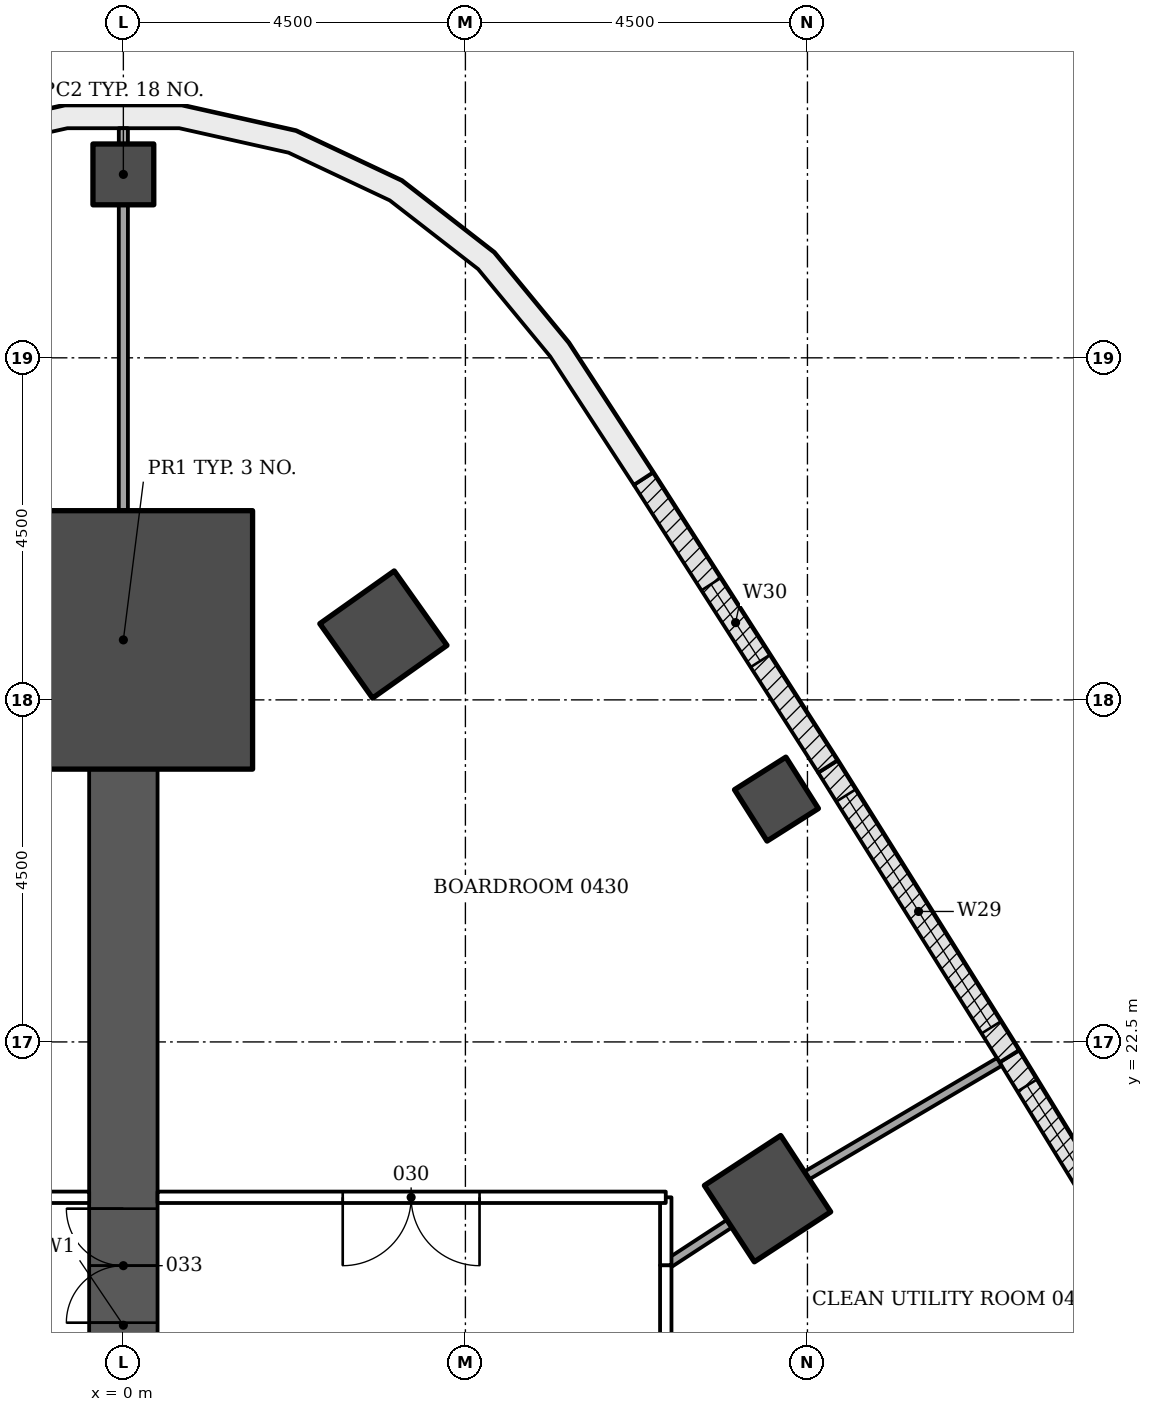
"""IFC4 building model, lengths in metres.
Left out: names, types, materials, properties, quantities, classifications, styles, units other than length and angle.
Written with IfcOpenShell. Run it as: python <this file> out.ifc"""

import sys

from ifc_helpers import new_model, si_unit, direction, frame, frame_2d, origin, origin_2d, place, context, subcontext, project, spatial, polyline, rectangle, outline, extrude, element, fill, save


model = new_model("IFC4")
c1 = context("Model", 3, precision=1e-05, world=origin(), true_north=direction((0.0, 1.0)))
c2 = subcontext(c1, "Body", "Model", "MODEL_VIEW")
j1 = project(units=[si_unit("LENGTHUNIT", "METRE"), si_unit("PLANEANGLEUNIT", "RADIAN")], contexts=[c1])
p1 = place(None, origin())
s1 = spatial("IfcSite", under=j1, at=p1, CompositionType="ELEMENT")
p2 = place(p1, origin())
s2 = spatial("IfcBuilding", under=s1, at=p2, CompositionType="ELEMENT")
p3 = place(p2, frame((0.0, 0.0, 19.5)))
s3 = spatial("IfcBuildingStorey", under=s2, at=p3, CompositionType="ELEMENT", Elevation=19.5)
for number, where, z_axis, x_axis in (
    (1, (8.475, 20.438, -0.25), (0.0, 0.0, 1.0), (0.837, 0.547, 0.0)),
    (2, (3.421, 27.86, -0.25), (0.0, 0.0, 1.0), (0.816, 0.578, 0.0)),
):
    element("IfcColumn", number, at=place(p3, frame(where, z_axis=z_axis, x_axis=x_axis)), inside=s3, PredefinedType="COLUMN", context=c2, shape_type="SweptSolid", body=[
        extrude(rectangle(XDim=1.2, YDim=1.2, at=origin_2d()), origin(), (0.0, 0.0, 1.0), 4.55),
    ])
for number, where, z_axis, x_axis in (
    (3, (0.0, 33.913, -0.25), (0.0, 0.0, 1.0), (0.0, 1.0, 0.0)),
    (4, (8.592, 25.695, -0.25), (0.0, 0.0, 1.0), (0.845, 0.535, 0.0)),
):
    element("IfcColumn", number, at=place(p3, frame(where, z_axis=z_axis, x_axis=x_axis)), inside=s3, PredefinedType="COLUMN", context=c2, shape_type="SweptSolid", body=[
        extrude(rectangle(XDim=0.8, YDim=0.8, at=origin_2d()), origin(), (0.0, 0.0, 1.0), 4.55),
    ])
p4 = place(p3, frame((0.0, 11.456, -0.25), z_axis=(0.0, 0.0, 1.0), x_axis=(0.0, 1.0, 0.0)))
e5 = element("IfcWall", 5, at=p4, inside=s3, PredefinedType="SHEAR", context=c2, shape_type="SweptSolid", body=[
    extrude(rectangle(XDim=14.633, YDim=0.9, at=frame_2d((7.316, 0.0))), origin(), (0.0, 0.0, 1.0), 4.55),
])
p5 = place(p4, frame((7.35, 0.0, 0.25)))
e6 = element("IfcOpeningElement", 6, at=p5, cuts=e5, PredefinedType="OPENING", context=c2, shape_type="SweptSolid", body=[
    extrude(rectangle(XDim=1.5, YDim=2.1, at=frame_2d((0.75, 1.05))), frame((0.0, 0.46, 0.0), z_axis=(0.0, -1.0, 0.0), x_axis=(1.0, 0.0, 0.0)), (0.0, 0.0, 1.0), 0.92),
])
p6 = place(p3, frame((0.0, 27.789, -0.25), z_axis=(0.0, 0.0, 1.0), x_axis=(0.0, 1.0, 0.0)))
e7 = element("IfcColumn", 7, at=p6, inside=s3, PredefinedType="COLUMN", context=c2, shape_type="SweptSolid", body=[
    extrude(rectangle(XDim=3.4, YDim=3.4, at=origin_2d()), origin(), (0.0, 0.0, 1.0), 4.55),
])
p7 = place(p3, frame((11.656, 22.309, 0.0), z_axis=(0.0, 0.0, 1.0), x_axis=(0.522078085402, -0.852897691838, 0.0)))
e8 = element("IfcWall", 8, at=p7, inside=s3, PredefinedType="NOTDEFINED", context=c2, shape_type="SweptSolid", body=[
    extrude(rectangle(XDim=4.496, YDim=0.3, at=frame_2d((2.248, 0.0))), origin(), (0.0, 0.0, 1.0), 4.3),
])
p8 = place(p7, frame((0.448, 0.0, 1.5)))
e9 = element("IfcOpeningElement", 9, at=p8, cuts=e8, PredefinedType="OPENING", context=c2, shape_type="SweptSolid", body=[
    extrude(rectangle(XDim=3.6, YDim=1.8, at=frame_2d((1.8, 0.9))), frame((0.0, 0.16, 0.0), z_axis=(0.0, -1.0, 0.0), x_axis=(1.0, 0.0, 0.0)), (0.0, 0.0, 1.0), 0.32),
])
p9 = place(p3, frame((9.269, 26.122, 0.0), z_axis=(0.0, 0.0, 1.0), x_axis=(0.530804082031, -0.847494558389, 0.0)))
e10 = element("IfcWall", 10, at=p9, inside=s3, PredefinedType="NOTDEFINED", context=c2, shape_type="SweptSolid", body=[
    extrude(rectangle(XDim=4.496, YDim=0.3, at=frame_2d((2.248, 0.0))), origin(), (0.0, 0.0, 1.0), 4.3),
])
p10 = place(p9, frame((0.448, 0.0, 1.5)))
e11 = element("IfcOpeningElement", 11, at=p10, cuts=e10, PredefinedType="OPENING", context=c2, shape_type="SweptSolid", body=[
    extrude(rectangle(XDim=3.6, YDim=1.8, at=frame_2d((1.8, 0.9))), frame((0.0, 0.16, 0.0), z_axis=(0.0, -1.0, 0.0), x_axis=(1.0, 0.0, 0.0)), (0.0, 0.0, 1.0), 0.32),
])
p11 = place(p3, frame((6.842, 29.909, 0.0), z_axis=(0.0, 0.0, 1.0), x_axis=(0.539483537275, -0.841996147859, 0.0)))
e12 = element("IfcWall", 12, at=p11, inside=s3, PredefinedType="NOTDEFINED", context=c2, shape_type="SweptSolid", body=[
    extrude(rectangle(XDim=4.496, YDim=0.3, at=frame_2d((2.248, 0.0))), origin(), (0.0, 0.0, 1.0), 4.3),
])
p12 = place(p11, frame((1.648, 0.0, 0.8)))
e13 = element("IfcOpeningElement", 13, at=p12, cuts=e12, PredefinedType="OPENING", context=c2, shape_type="SweptSolid", body=[
    extrude(rectangle(XDim=1.2, YDim=3.0, at=frame_2d((0.6, 1.5))), frame((0.0, 0.16, 0.0), z_axis=(0.0, -1.0, 0.0), x_axis=(1.0, 0.0, 0.0)), (0.0, 0.0, 1.0), 0.32),
])
p13 = place(p3, origin())
e14 = element("IfcWall", 14, at=p13, inside=s3, PredefinedType="NOTDEFINED", context=c2, shape_type="SweptSolid", body=[
    extrude(outline(polyline([(6.967, 29.992), (5.857, 31.697), (4.878, 32.884), (3.663, 33.828), (2.271, 34.485), (0.769, 34.821), (-0.769, 34.821), (-2.271, 34.485), (-3.663, 33.828), (-4.878, 32.884), (-5.857, 31.697), (-6.967, 29.992), (-6.716, 29.828), (-5.615, 31.519), (-4.667, 32.667), (-3.505, 33.571), (-2.173, 34.199), (-0.736, 34.521), (0.736, 34.521), (2.173, 34.199), (3.505, 33.571), (4.667, 32.667), (5.615, 31.519), (6.716, 29.828), (6.967, 29.992)])), origin(), (0.0, 0.0, 1.0), 4.3),
])
p14 = place(p3, frame((7.136, 16.096, 0.0), z_axis=(0.0, 0.0, 1.0), x_axis=(0.0, 1.0, 0.0)))
e15 = element("IfcWall", 15, at=p14, inside=s3, PredefinedType="PARTITIONING", context=c2, shape_type="SweptSolid", body=[
    extrude(rectangle(XDim=3.466, YDim=0.15, at=frame_2d((1.733, 0.0))), origin(), (0.0, 0.0, 1.0), 3.894),
])
p15 = place(p14, frame((1.25, 0.0, 0.0)))
e16 = element("IfcOpeningElement", 16, at=p15, cuts=e15, PredefinedType="OPENING", context=c2, shape_type="SweptSolid", body=[
    extrude(rectangle(XDim=0.9, YDim=2.1, at=frame_2d((0.45, 1.05))), frame((0.0, 0.085, 0.0), z_axis=(0.0, -1.0, 0.0), x_axis=(1.0, 0.0, 0.0)), (0.0, 0.0, 1.0), 0.17),
])
p16 = place(p3, frame((7.136, 19.563, 0.0), z_axis=(0.0, 0.0, 1.0), x_axis=(0.0, 1.0, 0.0)))
e17 = element("IfcWall", 17, at=p16, inside=s3, PredefinedType="PARTITIONING", context=c2, shape_type="SweptSolid", body=[
    extrude(rectangle(XDim=0.893, YDim=0.15, at=frame_2d((0.447, 0.0))), origin(), (0.0, 0.0, 1.0), 3.894),
])
p17 = place(p3, frame((7.136, 20.456, 0.0), z_axis=(0.0, 0.0, 1.0), x_axis=(-1.0, 0.0, 0.0)))
e18 = element("IfcWall", 18, at=p17, inside=s3, PredefinedType="PARTITIONING", context=c2, shape_type="SweptSolid", body=[
    extrude(rectangle(XDim=6.686, YDim=0.15, at=frame_2d((3.343, 0.0))), origin(), (0.0, 0.0, 1.0), 3.843),
])
p18 = place(p17, frame((2.45, 0.0, 0.0)))
e19 = element("IfcOpeningElement", 19, at=p18, cuts=e18, PredefinedType="OPENING", context=c2, shape_type="SweptSolid", body=[
    extrude(rectangle(XDim=1.8, YDim=2.1, at=frame_2d((0.9, 1.05))), frame((0.0, 0.085, 0.0), z_axis=(0.0, -1.0, 0.0), x_axis=(1.0, 0.0, 0.0)), (0.0, 0.0, 1.0), 0.17),
])
p19 = place(p3, frame((-0.45, 20.456, 0.0), z_axis=(0.0, 0.0, 1.0), x_axis=(-1.0, 0.0, 0.0)))
e20 = element("IfcWall", 20, at=p19, inside=s3, PredefinedType="PARTITIONING", context=c2, shape_type="SweptSolid", body=[
    extrude(rectangle(XDim=1.8, YDim=0.15, at=frame_2d((0.9, 0.0))), origin(), (0.0, 0.0, 1.0), 3.843),
])
p20 = place(p3, frame((7.973, 20.109, 0.0), z_axis=(0.0, 0.0, 1.0), x_axis=(-0.836986858992, -0.547222987341, 0.0)))
e21 = element("IfcWall", 21, at=p20, inside=s3, PredefinedType="PARTITIONING", context=c2, shape_type="SweptSolid", body=[
    extrude(rectangle(XDim=0.998, YDim=0.12, at=frame_2d((0.499, 0.0))), origin(), (0.0, 0.0, 1.0), 3.894),
])
p21 = place(p3, frame((11.524, 22.237, 0.0), z_axis=(0.0, 0.0, 1.0), x_axis=(-0.861228913487, -0.508217235613, 0.0)))
e22 = element("IfcWall", 22, at=p21, inside=s3, PredefinedType="PARTITIONING", context=c2, shape_type="SweptSolid", body=[
    extrude(rectangle(XDim=2.94, YDim=0.12, at=frame_2d((1.47, 0.0))), origin(), (0.0, 0.0, 1.0), 3.683),
])
p22 = place(p3, frame((0.0, 29.489, 0.0), z_axis=(0.0, 0.0, 1.0), x_axis=(0.0, 1.0, 0.0)))
e23 = element("IfcWall", 23, at=p22, inside=s3, PredefinedType="PARTITIONING", context=c2, shape_type="SweptSolid", body=[
    extrude(rectangle(XDim=4.024, YDim=0.12, at=frame_2d((2.012, 0.0))), origin(), (0.0, 0.0, 1.0), 3.767),
])
p23 = place(p3, frame((0.0, 34.313, 0.0), z_axis=(0.0, 0.0, 1.0), x_axis=(0.0, 1.0, 0.0)))
e24 = element("IfcWall", 24, at=p23, inside=s3, PredefinedType="PARTITIONING", context=c2, shape_type="SweptSolid", body=[
    extrude(rectangle(XDim=0.208, YDim=0.12, at=frame_2d((0.104, 0.0))), origin(), (0.0, 0.0, 1.0), 4.3),
])
p24 = place(p8, origin())
e25 = element("IfcWindow", 25, at=p24, inside=s3, PartitioningType="SINGLE_PANEL", PredefinedType="WINDOW", context=c2, shape_type="SweptSolid", body=[
    extrude(rectangle(XDim=3.6, YDim=1.8, at=frame_2d((1.8, 0.9))), frame((0.0, 0.03, 0.0), z_axis=(0.0, -1.0, 0.0), x_axis=(1.0, 0.0, 0.0)), (0.0, 0.0, 1.0), 0.06),
])
fill(e9, e25)
p25 = place(p10, origin())
e26 = element("IfcWindow", 26, at=p25, inside=s3, PartitioningType="SINGLE_PANEL", PredefinedType="WINDOW", context=c2, shape_type="SweptSolid", body=[
    extrude(rectangle(XDim=3.6, YDim=1.8, at=frame_2d((1.8, 0.9))), frame((0.0, 0.03, 0.0), z_axis=(0.0, -1.0, 0.0), x_axis=(1.0, 0.0, 0.0)), (0.0, 0.0, 1.0), 0.06),
])
fill(e11, e26)
p26 = place(p12, origin())
e27 = element("IfcWindow", 27, at=p26, inside=s3, PartitioningType="SINGLE_PANEL", PredefinedType="WINDOW", context=c2, shape_type="SweptSolid", body=[
    extrude(rectangle(XDim=1.2, YDim=3.0, at=frame_2d((0.6, 1.5))), frame((0.0, 0.03, 0.0), z_axis=(0.0, -1.0, 0.0), x_axis=(1.0, 0.0, 0.0)), (0.0, 0.0, 1.0), 0.06),
])
fill(e13, e27)
p27 = place(p18, origin())
e28 = element("IfcDoor", 28, at=p27, inside=s3, OperationType="DOUBLE_DOOR_SINGLE_SWING", PredefinedType="DOOR", context=c2, shape_type="SweptSolid", body=[
    extrude(rectangle(XDim=1.8, YDim=2.1, at=frame_2d((0.9, 1.05))), frame((0.0, 0.025, 0.0), z_axis=(0.0, -1.0, 0.0), x_axis=(1.0, 0.0, 0.0)), (0.0, 0.0, 1.0), 0.05),
])
fill(e19, e28)
p28 = place(p5, origin())
e29 = element("IfcDoor", 29, at=p28, inside=s3, OperationType="DOUBLE_DOOR_SINGLE_SWING", PredefinedType="DOOR", context=c2, shape_type="SweptSolid", body=[
    extrude(rectangle(XDim=1.5, YDim=2.1, at=frame_2d((0.75, 1.05))), frame((0.0, 0.025, 0.0), z_axis=(0.0, -1.0, 0.0), x_axis=(1.0, 0.0, 0.0)), (0.0, 0.0, 1.0), 0.05),
])
fill(e6, e29)
save(model, sys.argv[1])
